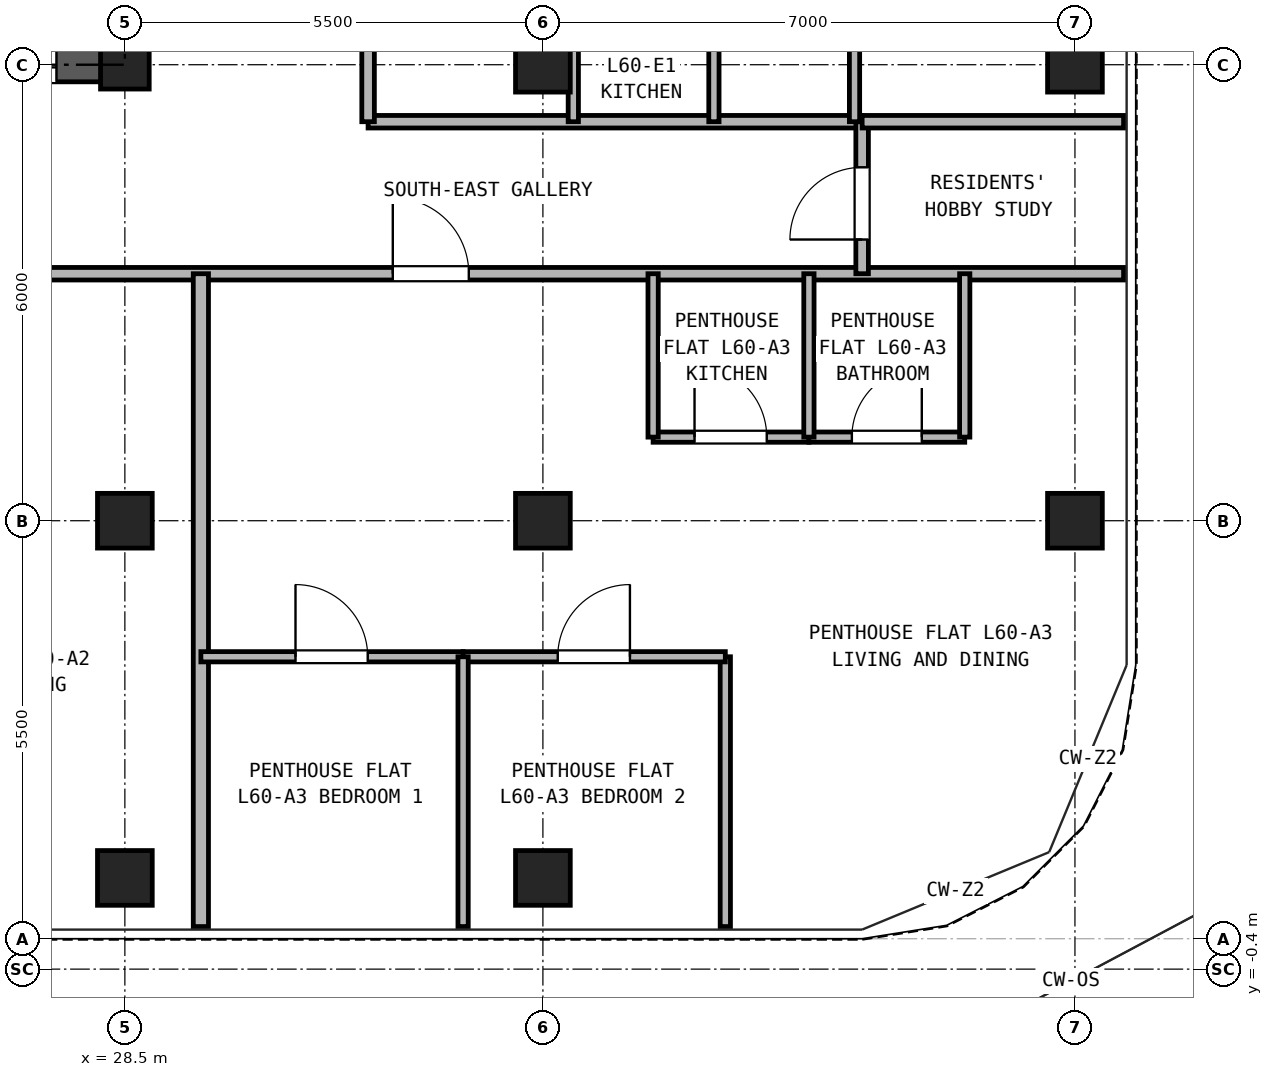
"""IFC4 building model, lengths in metres.
Left out: names, types, materials, properties, quantities, classifications, styles, units other than length and angle.
Written with IfcOpenShell. Run it as: python <this file> out.ifc"""

import sys

from ifc_helpers import new_model, si_unit, direction, frame, frame_2d, origin, origin_2d, place, context, subcontext, project, spatial, rectangle, hollow_rectangle, extrude, source, transform, mapped, element, fill, save


model = new_model("IFC4")
c1 = context("Model", 3, precision=1e-05, world=origin(), true_north=direction((0.0, 1.0)))
c2 = subcontext(c1, "Body", "Model", "MODEL_VIEW")
j1 = project(units=[si_unit("LENGTHUNIT", "METRE"), si_unit("PLANEANGLEUNIT", "RADIAN")], contexts=[c1])
p1 = place(None, origin())
s1 = spatial("IfcSite", under=j1, at=p1, CompositionType="ELEMENT")
p2 = place(p1, origin())
s2 = spatial("IfcBuilding", under=s1, at=p2, CompositionType="ELEMENT")
p3 = place(p2, frame((0.0, 0.0, 212.4)))
s3 = spatial("IfcBuildingStorey", under=s2, at=p3, CompositionType="ELEMENT", Elevation=212.4)
m1 = source(origin(), c2, "Body", "SweptSolid", [
    extrude(hollow_rectangle(XDim=0.72, YDim=0.72, WallThickness=0.04, at=origin_2d()), origin(), (0.0, 0.0, 1.0), 2.84),
])
for number, where, z_axis, x_axis in (
    (1, (28.5, 0.8, 0.0), (0.0, 0.0, 1.0), (1.0, 0.0, 0.0)),
    (2, (34.0, 0.8, 0.0), (0.0, 0.0, 1.0), (1.0, 0.0, 0.0)),
    (3, (41.0, 5.5, 0.0), (0.0, 0.0, 1.0), (1.0, 0.0, 0.0)),
    (4, (41.0, 11.5, 0.0), (0.0, 0.0, 1.0), (1.0, 0.0, 0.0)),
    (5, (28.5, 5.5, 0.0), (0.0, 0.0, 1.0), (1.0, 0.0, 0.0)),
):
    element("IfcColumn", number, at=place(p3, frame(where, z_axis=z_axis, x_axis=x_axis)), inside=s3, PredefinedType="COLUMN", context=c2, shape_type="MappedRepresentation", body=[
        mapped(m1, transform((0.0, 0.0, 0.0), x_axis=(1.0, 0.0, 0.0), y_axis=(0.0, 1.0, 0.0), z_axis=(0.0, 0.0, 1.0), scale=1.0)),
    ])
m2 = source(origin(), c2, "Body", "SweptSolid", [
    extrude(hollow_rectangle(XDim=0.64, YDim=0.64, WallThickness=0.035, at=origin_2d()), origin(), (0.0, 0.0, 1.0), 2.84),
])
p4 = place(p3, frame((28.5, 11.5, 0.0), z_axis=(0.0, 0.0, 1.0), x_axis=(1.0, 0.0, 0.0)))
e6 = element("IfcColumn", 6, at=p4, inside=s3, PredefinedType="COLUMN", context=c2, shape_type="MappedRepresentation", body=[
    mapped(m2, transform((0.0, 0.0, 0.0), x_axis=(1.0, 0.0, 0.0), y_axis=(0.0, 1.0, 0.0), z_axis=(0.0, 0.0, 1.0), scale=1.0)),
])
for number, where, z_axis, x_axis in (
    (7, (34.0, 5.5, 0.0), (0.0, 0.0, 1.0), (1.0, 0.0, 0.0)),
    (8, (34.0, 11.5, 0.0), (0.0, 0.0, 1.0), (1.0, 0.0, 0.0)),
):
    element("IfcColumn", number, at=place(p3, frame(where, z_axis=z_axis, x_axis=x_axis)), inside=s3, PredefinedType="COLUMN", context=c2, shape_type="MappedRepresentation", body=[
        mapped(m1, transform((0.0, 0.0, 0.0), x_axis=(1.0, 0.0, 0.0), y_axis=(0.0, 1.0, 0.0), z_axis=(0.0, 0.0, 1.0), scale=1.0)),
    ])
p5 = place(p3, frame((18.275, 11.5, 0.0), z_axis=(0.0, 0.0, 1.0), x_axis=(1.0, 0.0, 0.0)))
e9 = element("IfcWall", 9, at=p5, inside=s3, PredefinedType="SHEAR", context=c2, shape_type="SweptSolid", body=[
    extrude(rectangle(XDim=10.45, YDim=0.45, at=frame_2d((5.225, 0.0))), origin(), (0.0, 0.0, 1.0), 2.84),
])
p6 = place(p5, frame((1.825, 0.0, 0.0)))
e10 = element("IfcOpeningElement", 10, at=p6, cuts=e9, PredefinedType="OPENING", context=c2, shape_type="SweptSolid", body=[
    extrude(rectangle(XDim=0.95, YDim=2.15, at=frame_2d((0.475, 1.075))), frame((0.0, 0.235, 0.0), z_axis=(0.0, -1.0, 0.0), x_axis=(1.0, 0.0, 0.0)), (0.0, 0.0, 1.0), 0.47),
])
p7 = place(p5, frame((5.325, 0.0, 0.0)))
e11 = element("IfcOpeningElement", 11, at=p7, cuts=e9, PredefinedType="OPENING", context=c2, shape_type="SweptSolid", body=[
    extrude(rectangle(XDim=0.95, YDim=2.15, at=frame_2d((0.475, 1.075))), frame((0.0, 0.235, 0.0), z_axis=(0.0, -1.0, 0.0), x_axis=(1.0, 0.0, 0.0)), (0.0, 0.0, 1.0), 0.47),
])
p8 = place(p5, frame((8.225, 0.0, 0.0)))
e12 = element("IfcOpeningElement", 12, at=p8, cuts=e9, PredefinedType="OPENING", context=c2, shape_type="SweptSolid", body=[
    extrude(rectangle(XDim=1.1, YDim=2.25, at=frame_2d((0.55, 1.125))), frame((0.0, 0.235, 0.0), z_axis=(0.0, -1.0, 0.0), x_axis=(1.0, 0.0, 0.0)), (0.0, 0.0, 1.0), 0.47),
])
p9 = place(p3, frame((0.16, 8.75, 0.0), z_axis=(0.0, 0.0, 1.0), x_axis=(1.0, 0.0, 0.0)))
e13 = element("IfcWall", 13, at=p9, inside=s3, PredefinedType="PARTITIONING", context=c2, shape_type="SweptSolid", body=[
    extrude(rectangle(XDim=41.48, YDim=0.165, at=frame_2d((20.74, 0.0))), origin(), (0.0, 0.0, 1.0), 2.84),
])
p10 = place(p9, frame((13.315, 0.0, 0.0)))
e14 = element("IfcOpeningElement", 14, at=p10, cuts=e13, PredefinedType="OPENING", context=c2, shape_type="SweptSolid", body=[
    extrude(rectangle(XDim=1.0, YDim=2.15, at=frame_2d((0.5, 1.075))), frame((0.0, 0.093, 0.0), z_axis=(0.0, -1.0, 0.0), x_axis=(1.0, 0.0, 0.0)), (0.0, 0.0, 1.0), 0.185),
])
p11 = place(p9, frame((19.115, 0.0, 0.0)))
e15 = element("IfcOpeningElement", 15, at=p11, cuts=e13, PredefinedType="OPENING", context=c2, shape_type="SweptSolid", body=[
    extrude(rectangle(XDim=1.0, YDim=2.15, at=frame_2d((0.5, 1.075))), frame((0.0, 0.093, 0.0), z_axis=(0.0, -1.0, 0.0), x_axis=(1.0, 0.0, 0.0)), (0.0, 0.0, 1.0), 0.185),
])
p12 = place(p9, frame((31.865, 0.0, 0.0)))
e16 = element("IfcOpeningElement", 16, at=p12, cuts=e13, PredefinedType="OPENING", context=c2, shape_type="SweptSolid", body=[
    extrude(rectangle(XDim=1.0, YDim=2.15, at=frame_2d((0.5, 1.075))), frame((0.0, 0.093, 0.0), z_axis=(0.0, -1.0, 0.0), x_axis=(1.0, 0.0, 0.0)), (0.0, 0.0, 1.0), 0.185),
])
p13 = place(p3, frame((31.7, 10.75, 0.0), z_axis=(0.0, 0.0, 1.0), x_axis=(1.0, 0.0, 0.0)))
e17 = element("IfcWall", 17, at=p13, inside=s3, PredefinedType="PARTITIONING", context=c2, shape_type="SweptSolid", body=[
    extrude(rectangle(XDim=6.5, YDim=0.165, at=frame_2d((3.25, 0.0))), origin(), (0.0, 0.0, 1.0), 2.84),
])
p14 = place(p3, frame((38.2, 8.75, 0.0), z_axis=(0.0, 0.0, 1.0), x_axis=(0.0, 1.0, 0.0)))
e18 = element("IfcWall", 18, at=p14, inside=s3, PredefinedType="PARTITIONING", context=c2, shape_type="SweptSolid", body=[
    extrude(rectangle(XDim=2.0, YDim=0.165, at=frame_2d((1.0, 0.0))), origin(), (0.0, 0.0, 1.0), 2.84),
])
p15 = place(p14, frame((0.45, 0.0, 0.0)))
e19 = element("IfcOpeningElement", 19, at=p15, cuts=e18, PredefinedType="OPENING", context=c2, shape_type="SweptSolid", body=[
    extrude(rectangle(XDim=0.95, YDim=2.15, at=frame_2d((0.475, 1.075))), frame((0.0, 0.093, 0.0), z_axis=(0.0, -1.0, 0.0), x_axis=(1.0, 0.0, 0.0)), (0.0, 0.0, 1.0), 0.185),
])
p16 = place(p3, frame((31.7, 10.75, 0.0), z_axis=(0.0, 0.0, 1.0), x_axis=(0.0, 1.0, 0.0)))
e20 = element("IfcWall", 20, at=p16, inside=s3, PredefinedType="PARTITIONING", context=c2, shape_type="SweptSolid", body=[
    extrude(rectangle(XDim=24.39, YDim=0.165, at=frame_2d((12.195, 0.0))), origin(), (0.0, 0.0, 1.0), 2.84),
])
p17 = place(p16, frame((9.875, 0.0, 0.0)))
e21 = element("IfcOpeningElement", 21, at=p17, cuts=e20, PredefinedType="OPENING", context=c2, shape_type="SweptSolid", body=[
    extrude(rectangle(XDim=1.0, YDim=2.15, at=frame_2d((0.5, 1.075))), frame((0.0, 0.093, 0.0), z_axis=(0.0, -1.0, 0.0), x_axis=(1.0, 0.0, 0.0)), (0.0, 0.0, 1.0), 0.185),
])
p18 = place(p3, frame((29.5, 0.16, 0.0), z_axis=(0.0, 0.0, 1.0), x_axis=(0.0, 1.0, 0.0)))
e22 = element("IfcWall", 22, at=p18, inside=s3, PredefinedType="PARTITIONING", context=c2, shape_type="SweptSolid", body=[
    extrude(rectangle(XDim=8.59, YDim=0.2, at=frame_2d((4.295, 0.0))), origin(), (0.0, 0.0, 1.0), 2.84),
])
p19 = place(p3, frame((35.45, 6.6, 0.0), z_axis=(0.0, 0.0, 1.0), x_axis=(1.0, 0.0, 0.0)))
e23 = element("IfcWall", 23, at=p19, inside=s3, PredefinedType="PARTITIONING", context=c2, shape_type="SweptSolid", body=[
    extrude(rectangle(XDim=2.05, YDim=0.135, at=frame_2d((1.025, 0.0))), origin(), (0.0, 0.0, 1.0), 2.84),
])
p20 = place(p19, frame((0.545, 0.0, 0.0)))
e24 = element("IfcOpeningElement", 24, at=p20, cuts=e23, PredefinedType="OPENING", context=c2, shape_type="SweptSolid", body=[
    extrude(rectangle(XDim=0.95, YDim=2.15, at=frame_2d((0.475, 1.075))), frame((0.0, 0.077, 0.0), z_axis=(0.0, -1.0, 0.0), x_axis=(1.0, 0.0, 0.0)), (0.0, 0.0, 1.0), 0.155),
])
p21 = place(p3, frame((37.5, 6.6, 0.0), z_axis=(0.0, 0.0, 1.0), x_axis=(1.0, 0.0, 0.0)))
e25 = element("IfcWall", 25, at=p21, inside=s3, PredefinedType="PARTITIONING", context=c2, shape_type="SweptSolid", body=[
    extrude(rectangle(XDim=2.05, YDim=0.135, at=frame_2d((1.025, 0.0))), origin(), (0.0, 0.0, 1.0), 2.84),
])
p22 = place(p21, frame((0.565, 0.0, 0.0)))
e26 = element("IfcOpeningElement", 26, at=p22, cuts=e25, PredefinedType="OPENING", context=c2, shape_type="SweptSolid", body=[
    extrude(rectangle(XDim=0.92, YDim=2.1, at=frame_2d((0.46, 1.05))), frame((0.0, 0.077, 0.0), z_axis=(0.0, -1.0, 0.0), x_axis=(1.0, 0.0, 0.0)), (0.0, 0.0, 1.0), 0.155),
])
for number, where, z_axis, x_axis in (
    (27, (35.45, 6.6, 0.0), (0.0, 0.0, 1.0), (0.0, 1.0, 0.0)),
    (28, (37.5, 6.6, 0.0), (0.0, 0.0, 1.0), (0.0, 1.0, 0.0)),
    (29, (39.55, 6.6, 0.0), (0.0, 0.0, 1.0), (0.0, 1.0, 0.0)),
):
    element("IfcWall", number, at=place(p3, frame(where, z_axis=z_axis, x_axis=x_axis)), inside=s3, PredefinedType="PARTITIONING", context=c2, shape_type="SweptSolid", body=[
        extrude(rectangle(XDim=2.15, YDim=0.135, at=frame_2d((1.075, 0.0))), origin(), (0.0, 0.0, 1.0), 2.84),
    ])
p23 = place(p3, frame((36.4, 0.16, 0.0), z_axis=(0.0, 0.0, 1.0), x_axis=(0.0, 1.0, 0.0)))
e30 = element("IfcWall", 30, at=p23, inside=s3, PredefinedType="PARTITIONING", context=c2, shape_type="SweptSolid", body=[
    extrude(rectangle(XDim=3.55, YDim=0.135, at=frame_2d((1.775, 0.0))), origin(), (0.0, 0.0, 1.0), 2.84),
])
p24 = place(p3, frame((29.5, 3.71, 0.0), z_axis=(0.0, 0.0, 1.0), x_axis=(1.0, 0.0, 0.0)))
e31 = element("IfcWall", 31, at=p24, inside=s3, PredefinedType="PARTITIONING", context=c2, shape_type="SweptSolid", body=[
    extrude(rectangle(XDim=3.45, YDim=0.135, at=frame_2d((1.725, 0.0))), origin(), (0.0, 0.0, 1.0), 2.84),
])
p25 = place(p24, frame((1.245, 0.0, 0.0)))
e32 = element("IfcOpeningElement", 32, at=p25, cuts=e31, PredefinedType="OPENING", context=c2, shape_type="SweptSolid", body=[
    extrude(rectangle(XDim=0.95, YDim=2.15, at=frame_2d((0.475, 1.075))), frame((0.0, 0.077, 0.0), z_axis=(0.0, -1.0, 0.0), x_axis=(1.0, 0.0, 0.0)), (0.0, 0.0, 1.0), 0.155),
])
p26 = place(p3, frame((32.95, 3.71, 0.0), z_axis=(0.0, 0.0, 1.0), x_axis=(1.0, 0.0, 0.0)))
e33 = element("IfcWall", 33, at=p26, inside=s3, PredefinedType="PARTITIONING", context=c2, shape_type="SweptSolid", body=[
    extrude(rectangle(XDim=3.45, YDim=0.135, at=frame_2d((1.725, 0.0))), origin(), (0.0, 0.0, 1.0), 2.84),
])
p27 = place(p26, frame((1.245, 0.0, 0.0)))
e34 = element("IfcOpeningElement", 34, at=p27, cuts=e33, PredefinedType="OPENING", context=c2, shape_type="SweptSolid", body=[
    extrude(rectangle(XDim=0.95, YDim=2.15, at=frame_2d((0.475, 1.075))), frame((0.0, 0.077, 0.0), z_axis=(0.0, -1.0, 0.0), x_axis=(1.0, 0.0, 0.0)), (0.0, 0.0, 1.0), 0.155),
])
p28 = place(p3, frame((32.95, 0.16, 0.0), z_axis=(0.0, 0.0, 1.0), x_axis=(0.0, 1.0, 0.0)))
e35 = element("IfcWall", 35, at=p28, inside=s3, PredefinedType="PARTITIONING", context=c2, shape_type="SweptSolid", body=[
    extrude(rectangle(XDim=3.55, YDim=0.135, at=frame_2d((1.775, 0.0))), origin(), (0.0, 0.0, 1.0), 2.84),
])
p29 = place(p3, frame((38.2, 10.75, 0.0), z_axis=(0.0, 0.0, 1.0), x_axis=(1.0, 0.0, 0.0)))
e36 = element("IfcWall", 36, at=p29, inside=s3, PredefinedType="PARTITIONING", context=c2, shape_type="SweptSolid", body=[
    extrude(rectangle(XDim=3.44, YDim=0.165, at=frame_2d((1.72, 0.0))), origin(), (0.0, 0.0, 1.0), 2.84),
])
for number, where, z_axis, x_axis in (
    (37, (34.4, 10.75, 0.0), (0.0, 0.0, 1.0), (0.0, 1.0, 0.0)),
    (38, (36.25, 10.75, 0.0), (0.0, 0.0, 1.0), (0.0, 1.0, 0.0)),
    (39, (38.1, 10.75, 0.0), (0.0, 0.0, 1.0), (0.0, 1.0, 0.0)),
):
    element("IfcWall", number, at=place(p3, frame(where, z_axis=z_axis, x_axis=x_axis)), inside=s3, PredefinedType="PARTITIONING", context=c2, shape_type="SweptSolid", body=[
        extrude(rectangle(XDim=2.15, YDim=0.135, at=frame_2d((1.075, 0.0))), origin(), (0.0, 0.0, 1.0), 2.84),
    ])
p30 = place(p8, frame((1.1, 0.0, 0.0), z_axis=(0.0, 0.0, 1.0), x_axis=(-1.0, 0.0, 0.0)))
e40 = element("IfcDoor", 40, at=p30, inside=s3, OperationType="DOUBLE_DOOR_SLIDING", PredefinedType="DOOR", context=c2, shape_type="SweptSolid", body=[
    extrude(rectangle(XDim=1.1, YDim=2.25, at=frame_2d((0.55, 1.125))), frame((0.0, 0.025, 0.0), z_axis=(0.0, -1.0, 0.0), x_axis=(1.0, 0.0, 0.0)), (0.0, 0.0, 1.0), 0.05),
])
fill(e12, e40)
p31 = place(p20, origin())
e41 = element("IfcDoor", 41, at=p31, inside=s3, OperationType="SINGLE_SWING_LEFT", PredefinedType="DOOR", context=c2, shape_type="SweptSolid", body=[
    extrude(rectangle(XDim=0.95, YDim=2.15, at=frame_2d((0.475, 1.075))), frame((0.0, 0.025, 0.0), z_axis=(0.0, -1.0, 0.0), x_axis=(1.0, 0.0, 0.0)), (0.0, 0.0, 1.0), 0.05),
])
fill(e24, e41)
p32 = place(p22, origin())
e42 = element("IfcDoor", 42, at=p32, inside=s3, OperationType="SINGLE_SWING_RIGHT", PredefinedType="DOOR", context=c2, shape_type="SweptSolid", body=[
    extrude(rectangle(XDim=0.92, YDim=2.1, at=frame_2d((0.46, 1.05))), frame((0.0, 0.025, 0.0), z_axis=(0.0, -1.0, 0.0), x_axis=(1.0, 0.0, 0.0)), (0.0, 0.0, 1.0), 0.05),
])
fill(e26, e42)
p33 = place(p25, frame((0.95, 0.0, 0.0), z_axis=(0.0, 0.0, 1.0), x_axis=(-1.0, 0.0, 0.0)))
e43 = element("IfcDoor", 43, at=p33, inside=s3, OperationType="SINGLE_SWING_LEFT", PredefinedType="DOOR", context=c2, shape_type="SweptSolid", body=[
    extrude(rectangle(XDim=0.95, YDim=2.15, at=frame_2d((0.475, 1.075))), frame((0.0, 0.025, 0.0), z_axis=(0.0, -1.0, 0.0), x_axis=(1.0, 0.0, 0.0)), (0.0, 0.0, 1.0), 0.05),
])
fill(e32, e43)
p34 = place(p27, frame((0.95, 0.0, 0.0), z_axis=(0.0, 0.0, 1.0), x_axis=(-1.0, 0.0, 0.0)))
e44 = element("IfcDoor", 44, at=p34, inside=s3, OperationType="SINGLE_SWING_RIGHT", PredefinedType="DOOR", context=c2, shape_type="SweptSolid", body=[
    extrude(rectangle(XDim=0.95, YDim=2.15, at=frame_2d((0.475, 1.075))), frame((0.0, 0.025, 0.0), z_axis=(0.0, -1.0, 0.0), x_axis=(1.0, 0.0, 0.0)), (0.0, 0.0, 1.0), 0.05),
])
fill(e34, e44)
p35 = place(p12, frame((1.0, 0.0, 0.0), z_axis=(0.0, 0.0, 1.0), x_axis=(-1.0, 0.0, 0.0)))
e45 = element("IfcDoor", 45, at=p35, inside=s3, OperationType="SINGLE_SWING_LEFT", PredefinedType="DOOR", context=c2, shape_type="SweptSolid", body=[
    extrude(rectangle(XDim=1.0, YDim=2.15, at=frame_2d((0.5, 1.075))), frame((0.0, 0.025, 0.0), z_axis=(0.0, -1.0, 0.0), x_axis=(1.0, 0.0, 0.0)), (0.0, 0.0, 1.0), 0.05),
])
fill(e16, e45)
p36 = place(p15, origin())
e46 = element("IfcDoor", 46, at=p36, inside=s3, OperationType="SINGLE_SWING_LEFT", PredefinedType="DOOR", context=c2, shape_type="SweptSolid", body=[
    extrude(rectangle(XDim=0.95, YDim=2.15, at=frame_2d((0.475, 1.075))), frame((0.0, 0.025, 0.0), z_axis=(0.0, -1.0, 0.0), x_axis=(1.0, 0.0, 0.0)), (0.0, 0.0, 1.0), 0.05),
])
fill(e19, e46)
save(model, sys.argv[1])
